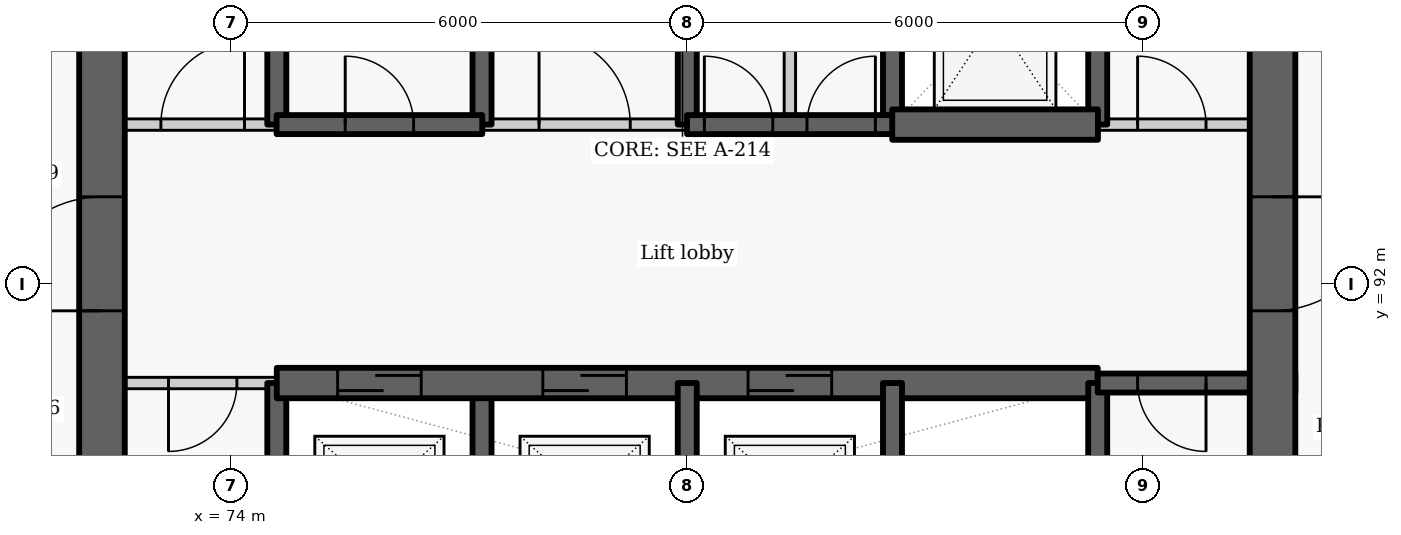
"""IFC4 building model, lengths in metres.
Left out: names, types, materials, properties, quantities, classifications, styles, units other than length and angle.
Written with IfcOpenShell. Run it as: python <this file> out.ifc"""

import sys

from ifc_helpers import new_model, si_unit, direction, frame, frame_2d, origin, place, context, subcontext, project, spatial, rectangle, extrude, element, fill, save


model = new_model("IFC4")
c1 = context("Model", 3, precision=1e-05, world=origin(), true_north=direction((0.0, 1.0)))
c2 = subcontext(c1, "Body", "Model", "MODEL_VIEW")
j1 = project(units=[si_unit("LENGTHUNIT", "METRE"), si_unit("PLANEANGLEUNIT", "RADIAN")], contexts=[c1])
p1 = place(None, origin())
s1 = spatial("IfcSite", under=j1, at=p1, CompositionType="ELEMENT")
p2 = place(p1, origin())
s2 = spatial("IfcBuilding", under=s1, at=p2, CompositionType="ELEMENT")
p3 = place(p2, frame((0.0, 0.0, 67.8)))
s3 = spatial("IfcBuildingStorey", under=s2, at=p3, CompositionType="ELEMENT", Elevation=67.8)
p4 = place(p3, frame((74.6, 87.8, -0.275), z_axis=(0.0, 0.0, 1.0), x_axis=(0.0, 1.0, 0.0)))
e1 = element("IfcWall", 1, at=p4, inside=s3, PredefinedType="SHEAR", context=c2, shape_type="SweptSolid", body=[
    extrude(rectangle(XDim=2.9, YDim=0.25, at=frame_2d((1.45, 0.0))), origin(), (0.0, 0.0, 1.0), 3.225),
])
p5 = place(p3, frame((74.6, 94.1, -0.275), z_axis=(0.0, 0.0, 1.0), x_axis=(0.0, 1.0, 0.0)))
e2 = element("IfcWall", 2, at=p5, inside=s3, PredefinedType="SHEAR", context=c2, shape_type="SweptSolid", body=[
    extrude(rectangle(XDim=2.8, YDim=0.25, at=frame_2d((1.4, 0.0))), origin(), (0.0, 0.0, 1.0), 3.225),
])
p6 = place(p3, frame((74.6, 90.7, 0.0), z_axis=(0.0, 0.0, 1.0), x_axis=(-1.0, 0.0, 0.0)))
e3 = element("IfcWall", 3, at=p6, inside=s3, PredefinedType="PARTITIONING", context=c2, shape_type="SweptSolid", body=[
    extrude(rectangle(XDim=2.6, YDim=0.15, at=frame_2d((1.3, 0.0))), origin(), (0.0, 0.0, 1.0), 2.95),
])
p7 = place(p6, frame((0.525, 0.0, 0.0)))
e4 = element("IfcOpeningElement", 4, at=p7, cuts=e3, PredefinedType="OPENING", context=c2, shape_type="SweptSolid", body=[
    extrude(rectangle(XDim=0.9, YDim=2.1, at=frame_2d((0.45, 1.05))), frame((0.0, 0.085, 0.0), z_axis=(0.0, -1.0, 0.0), x_axis=(1.0, 0.0, 0.0)), (0.0, 0.0, 1.0), 0.17),
])
p8 = place(p3, frame((72.3, 87.8, -0.275), z_axis=(0.0, 0.0, 1.0), x_axis=(0.0, 1.0, 0.0)))
e5 = element("IfcWall", 5, at=p8, inside=s3, PredefinedType="SHEAR", context=c2, shape_type="SweptSolid", body=[
    extrude(rectangle(XDim=9.1, YDim=0.6, at=frame_2d((4.55, 0.0))), origin(), (0.0, 0.0, 1.0), 3.225),
])
p9 = place(p8, frame((3.85, 0.0, 0.275)))
e6 = element("IfcOpeningElement", 6, at=p9, cuts=e5, PredefinedType="OPENING", context=c2, shape_type="SweptSolid", body=[
    extrude(rectangle(XDim=1.5, YDim=2.1, at=frame_2d((0.75, 1.05))), frame((0.0, 0.31, 0.0), z_axis=(0.0, -1.0, 0.0), x_axis=(1.0, 0.0, 0.0)), (0.0, 0.0, 1.0), 0.62),
])
p10 = place(p3, frame((77.3, 87.8, -0.275), z_axis=(0.0, 0.0, 1.0), x_axis=(0.0, 1.0, 0.0)))
e7 = element("IfcWall", 7, at=p10, inside=s3, PredefinedType="SHEAR", context=c2, shape_type="SweptSolid", body=[
    extrude(rectangle(XDim=2.9, YDim=0.25, at=frame_2d((1.45, 0.0))), origin(), (0.0, 0.0, 1.0), 3.225),
])
p11 = place(p3, frame((77.3, 94.1, -0.275), z_axis=(0.0, 0.0, 1.0), x_axis=(0.0, 1.0, 0.0)))
e8 = element("IfcWall", 8, at=p11, inside=s3, PredefinedType="SHEAR", context=c2, shape_type="SweptSolid", body=[
    extrude(rectangle(XDim=2.8, YDim=0.25, at=frame_2d((1.4, 0.0))), origin(), (0.0, 0.0, 1.0), 3.225),
])
p12 = place(p3, frame((74.6, 90.7, -0.275), z_axis=(0.0, 0.0, 1.0), x_axis=(1.0, 0.0, 0.0)))
e9 = element("IfcWall", 9, at=p12, inside=s3, PredefinedType="SHEAR", context=c2, shape_type="SweptSolid", body=[
    extrude(rectangle(XDim=10.8, YDim=0.4, at=frame_2d((5.4, 0.0))), origin(), (0.0, 0.0, 1.0), 3.225),
])
p13 = place(p12, frame((0.8, 0.0, 0.275)))
e10 = element("IfcOpeningElement", 10, at=p13, cuts=e9, PredefinedType="OPENING", context=c2, shape_type="SweptSolid", body=[
    extrude(rectangle(XDim=1.1, YDim=2.1, at=frame_2d((0.55, 1.05))), frame((0.0, 0.21, 0.0), z_axis=(0.0, -1.0, 0.0), x_axis=(1.0, 0.0, 0.0)), (0.0, 0.0, 1.0), 0.42),
])
p14 = place(p12, frame((3.5, 0.0, 0.275)))
e11 = element("IfcOpeningElement", 11, at=p14, cuts=e9, PredefinedType="OPENING", context=c2, shape_type="SweptSolid", body=[
    extrude(rectangle(XDim=1.1, YDim=2.1, at=frame_2d((0.55, 1.05))), frame((0.0, 0.21, 0.0), z_axis=(0.0, -1.0, 0.0), x_axis=(1.0, 0.0, 0.0)), (0.0, 0.0, 1.0), 0.42),
])
p15 = place(p12, frame((6.2, 0.0, 0.275)))
e12 = element("IfcOpeningElement", 12, at=p15, cuts=e9, PredefinedType="OPENING", context=c2, shape_type="SweptSolid", body=[
    extrude(rectangle(XDim=1.1, YDim=2.1, at=frame_2d((0.55, 1.05))), frame((0.0, 0.21, 0.0), z_axis=(0.0, -1.0, 0.0), x_axis=(1.0, 0.0, 0.0)), (0.0, 0.0, 1.0), 0.42),
])
p16 = place(p3, frame((80.0, 87.8, -0.275), z_axis=(0.0, 0.0, 1.0), x_axis=(0.0, 1.0, 0.0)))
e13 = element("IfcWall", 13, at=p16, inside=s3, PredefinedType="SHEAR", context=c2, shape_type="SweptSolid", body=[
    extrude(rectangle(XDim=2.9, YDim=0.25, at=frame_2d((1.45, 0.0))), origin(), (0.0, 0.0, 1.0), 3.225),
])
p17 = place(p3, frame((80.0, 94.1, -0.275), z_axis=(0.0, 0.0, 1.0), x_axis=(0.0, 1.0, 0.0)))
e14 = element("IfcWall", 14, at=p17, inside=s3, PredefinedType="SHEAR", context=c2, shape_type="SweptSolid", body=[
    extrude(rectangle(XDim=2.8, YDim=0.25, at=frame_2d((1.4, 0.0))), origin(), (0.0, 0.0, 1.0), 3.225),
])
p18 = place(p3, frame((82.7, 87.8, -0.275), z_axis=(0.0, 0.0, 1.0), x_axis=(0.0, 1.0, 0.0)))
e15 = element("IfcWall", 15, at=p18, inside=s3, PredefinedType="SHEAR", context=c2, shape_type="SweptSolid", body=[
    extrude(rectangle(XDim=2.9, YDim=0.25, at=frame_2d((1.45, 0.0))), origin(), (0.0, 0.0, 1.0), 3.225),
])
p19 = place(p3, frame((82.7, 94.1, -0.275), z_axis=(0.0, 0.0, 1.0), x_axis=(0.0, 1.0, 0.0)))
e16 = element("IfcWall", 16, at=p19, inside=s3, PredefinedType="SHEAR", context=c2, shape_type="SweptSolid", body=[
    extrude(rectangle(XDim=2.8, YDim=0.25, at=frame_2d((1.4, 0.0))), origin(), (0.0, 0.0, 1.0), 3.225),
])
p20 = place(p3, frame((85.4, 87.8, -0.275), z_axis=(0.0, 0.0, 1.0), x_axis=(0.0, 1.0, 0.0)))
e17 = element("IfcWall", 17, at=p20, inside=s3, PredefinedType="SHEAR", context=c2, shape_type="SweptSolid", body=[
    extrude(rectangle(XDim=2.9, YDim=0.25, at=frame_2d((1.45, 0.0))), origin(), (0.0, 0.0, 1.0), 3.225),
])
p21 = place(p3, frame((85.4, 94.1, -0.275), z_axis=(0.0, 0.0, 1.0), x_axis=(0.0, 1.0, 0.0)))
e18 = element("IfcWall", 18, at=p21, inside=s3, PredefinedType="SHEAR", context=c2, shape_type="SweptSolid", body=[
    extrude(rectangle(XDim=2.8, YDim=0.25, at=frame_2d((1.4, 0.0))), origin(), (0.0, 0.0, 1.0), 3.225),
])
p22 = place(p3, frame((88.0, 90.7, -0.275), z_axis=(0.0, 0.0, 1.0), x_axis=(-1.0, 0.0, 0.0)))
e19 = element("IfcWall", 19, at=p22, inside=s3, PredefinedType="SHEAR", context=c2, shape_type="SweptSolid", body=[
    extrude(rectangle(XDim=2.6, YDim=0.25, at=frame_2d((1.3, 0.0))), origin(), (0.0, 0.0, 1.0), 3.225),
])
p23 = place(p22, frame((1.175, 0.0, 0.275)))
e20 = element("IfcOpeningElement", 20, at=p23, cuts=e19, PredefinedType="OPENING", context=c2, shape_type="SweptSolid", body=[
    extrude(rectangle(XDim=0.9, YDim=2.1, at=frame_2d((0.45, 1.05))), frame((0.0, 0.135, 0.0), z_axis=(0.0, -1.0, 0.0), x_axis=(1.0, 0.0, 0.0)), (0.0, 0.0, 1.0), 0.27),
])
p24 = place(p3, frame((87.7, 103.4, -0.275), z_axis=(0.0, 0.0, 1.0), x_axis=(0.0, -1.0, 0.0)))
e21 = element("IfcWall", 21, at=p24, inside=s3, PredefinedType="SHEAR", context=c2, shape_type="SweptSolid", body=[
    extrude(rectangle(XDim=15.6, YDim=0.6, at=frame_2d((7.8, 0.0))), origin(), (0.0, 0.0, 1.0), 3.225),
])
p25 = place(p24, frame((10.25, 0.0, 0.275)))
e22 = element("IfcOpeningElement", 22, at=p25, cuts=e21, PredefinedType="OPENING", context=c2, shape_type="SweptSolid", body=[
    extrude(rectangle(XDim=1.5, YDim=2.1, at=frame_2d((0.75, 1.05))), frame((0.0, 0.31, 0.0), z_axis=(0.0, -1.0, 0.0), x_axis=(1.0, 0.0, 0.0)), (0.0, 0.0, 1.0), 0.62),
])
p26 = place(p24, frame((2.7, 0.0, 0.275)))
e23 = element("IfcOpeningElement", 23, at=p26, cuts=e21, PredefinedType="OPENING", context=c2, shape_type="SweptSolid", body=[
    extrude(rectangle(XDim=1.1, YDim=2.1, at=frame_2d((0.55, 1.05))), frame((0.0, 0.31, 0.0), z_axis=(0.0, -1.0, 0.0), x_axis=(1.0, 0.0, 0.0)), (0.0, 0.0, 1.0), 0.62),
])
p27 = place(p3, frame((72.0, 94.1, 0.0), z_axis=(0.0, 0.0, 1.0), x_axis=(1.0, 0.0, 0.0)))
e24 = element("IfcWall", 24, at=p27, inside=s3, PredefinedType="PARTITIONING", context=c2, shape_type="SweptSolid", body=[
    extrude(rectangle(XDim=2.603, YDim=0.15, at=frame_2d((1.302, 0.0))), origin(), (0.0, 0.0, 1.0), 2.95),
])
p28 = place(p27, frame((1.075, 0.0, 0.0)))
e25 = element("IfcOpeningElement", 25, at=p28, cuts=e24, PredefinedType="OPENING", context=c2, shape_type="SweptSolid", body=[
    extrude(rectangle(XDim=1.1, YDim=2.1, at=frame_2d((0.55, 1.05))), frame((0.0, 0.085, 0.0), z_axis=(0.0, -1.0, 0.0), x_axis=(1.0, 0.0, 0.0)), (0.0, 0.0, 1.0), 0.17),
])
p29 = place(p3, frame((77.297, 94.1, 0.0), z_axis=(0.0, 0.0, 1.0), x_axis=(1.0, 0.0, 0.0)))
e26 = element("IfcWall", 26, at=p29, inside=s3, PredefinedType="PARTITIONING", context=c2, shape_type="SweptSolid", body=[
    extrude(rectangle(XDim=2.706, YDim=0.15, at=frame_2d((1.353, 0.0))), origin(), (0.0, 0.0, 1.0), 2.95),
])
p30 = place(p29, frame((0.753, 0.0, 0.0)))
e27 = element("IfcOpeningElement", 27, at=p30, cuts=e26, PredefinedType="OPENING", context=c2, shape_type="SweptSolid", body=[
    extrude(rectangle(XDim=1.2, YDim=2.1, at=frame_2d((0.6, 1.05))), frame((0.0, 0.085, 0.0), z_axis=(0.0, -1.0, 0.0), x_axis=(1.0, 0.0, 0.0)), (0.0, 0.0, 1.0), 0.17),
])
p31 = place(p3, frame((85.397, 94.1, 0.0), z_axis=(0.0, 0.0, 1.0), x_axis=(1.0, 0.0, 0.0)))
e28 = element("IfcWall", 28, at=p31, inside=s3, PredefinedType="PARTITIONING", context=c2, shape_type="SweptSolid", body=[
    extrude(rectangle(XDim=2.603, YDim=0.15, at=frame_2d((1.302, 0.0))), origin(), (0.0, 0.0, 1.0), 2.95),
])
p32 = place(p31, frame((0.528, 0.0, 0.0)))
e29 = element("IfcOpeningElement", 29, at=p32, cuts=e28, PredefinedType="OPENING", context=c2, shape_type="SweptSolid", body=[
    extrude(rectangle(XDim=0.9, YDim=2.1, at=frame_2d((0.45, 1.05))), frame((0.0, 0.085, 0.0), z_axis=(0.0, -1.0, 0.0), x_axis=(1.0, 0.0, 0.0)), (0.0, 0.0, 1.0), 0.17),
])
p33 = place(p3, frame((74.597, 94.1, -0.275), z_axis=(0.0, 0.0, 1.0), x_axis=(1.0, 0.0, 0.0)))
e30 = element("IfcWall", 30, at=p33, inside=s3, PredefinedType="SHEAR", context=c2, shape_type="SweptSolid", body=[
    extrude(rectangle(XDim=2.706, YDim=0.25, at=frame_2d((1.353, 0.0))), origin(), (0.0, 0.0, 1.0), 3.225),
])
p34 = place(p33, frame((0.903, 0.0, 0.275)))
e31 = element("IfcOpeningElement", 31, at=p34, cuts=e30, PredefinedType="OPENING", context=c2, shape_type="SweptSolid", body=[
    extrude(rectangle(XDim=0.9, YDim=2.1, at=frame_2d((0.45, 1.05))), frame((0.0, 0.135, 0.0), z_axis=(0.0, -1.0, 0.0), x_axis=(1.0, 0.0, 0.0)), (0.0, 0.0, 1.0), 0.27),
])
p35 = place(p3, frame((79.997, 94.1, -0.275), z_axis=(0.0, 0.0, 1.0), x_axis=(1.0, 0.0, 0.0)))
e32 = element("IfcWall", 32, at=p35, inside=s3, PredefinedType="SHEAR", context=c2, shape_type="SweptSolid", body=[
    extrude(rectangle(XDim=2.706, YDim=0.25, at=frame_2d((1.353, 0.0))), origin(), (0.0, 0.0, 1.0), 3.225),
])
p36 = place(p35, frame((0.228, 0.0, 0.275)))
e33 = element("IfcOpeningElement", 33, at=p36, cuts=e32, PredefinedType="OPENING", context=c2, shape_type="SweptSolid", body=[
    extrude(rectangle(XDim=0.9, YDim=2.1, at=frame_2d((0.45, 1.05))), frame((0.0, 0.135, 0.0), z_axis=(0.0, -1.0, 0.0), x_axis=(1.0, 0.0, 0.0)), (0.0, 0.0, 1.0), 0.27),
])
p37 = place(p35, frame((1.578, 0.0, 0.275)))
e34 = element("IfcOpeningElement", 34, at=p37, cuts=e32, PredefinedType="OPENING", context=c2, shape_type="SweptSolid", body=[
    extrude(rectangle(XDim=0.9, YDim=2.1, at=frame_2d((0.45, 1.05))), frame((0.0, 0.135, 0.0), z_axis=(0.0, -1.0, 0.0), x_axis=(1.0, 0.0, 0.0)), (0.0, 0.0, 1.0), 0.27),
])
p38 = place(p3, frame((82.697, 94.1, -0.275), z_axis=(0.0, 0.0, 1.0), x_axis=(1.0, 0.0, 0.0)))
e35 = element("IfcWall", 35, at=p38, inside=s3, PredefinedType="SHEAR", context=c2, shape_type="SweptSolid", body=[
    extrude(rectangle(XDim=2.706, YDim=0.4, at=frame_2d((1.353, 0.0))), origin(), (0.0, 0.0, 1.0), 3.225),
])
p39 = place(p3, frame((81.35, 94.1, 0.0), z_axis=(0.0, 0.0, 1.0), x_axis=(0.0, 1.0, 0.0)))
e36 = element("IfcWall", 36, at=p39, inside=s3, PredefinedType="PARTITIONING", context=c2, shape_type="SweptSolid", body=[
    extrude(rectangle(XDim=2.8, YDim=0.15, at=frame_2d((1.4, 0.0))), origin(), (0.0, 0.0, 1.0), 2.95),
])
p40 = place(p7, origin())
e37 = element("IfcDoor", 37, at=p40, inside=s3, OperationType="SINGLE_SWING_RIGHT", PredefinedType="DOOR", context=c2, shape_type="SweptSolid", body=[
    extrude(rectangle(XDim=0.9, YDim=2.1, at=frame_2d((0.45, 1.05))), frame((0.0, 0.025, 0.0), z_axis=(0.0, -1.0, 0.0), x_axis=(1.0, 0.0, 0.0)), (0.0, 0.0, 1.0), 0.05),
])
fill(e4, e37)
p41 = place(p13, origin())
e38 = element("IfcDoor", 38, at=p41, inside=s3, OperationType="SLIDING_TO_LEFT", PredefinedType="DOOR", context=c2, shape_type="SweptSolid", body=[
    extrude(rectangle(XDim=1.1, YDim=2.1, at=frame_2d((0.55, 1.05))), frame((0.0, 0.025, 0.0), z_axis=(0.0, -1.0, 0.0), x_axis=(1.0, 0.0, 0.0)), (0.0, 0.0, 1.0), 0.05),
])
fill(e10, e38)
p42 = place(p14, origin())
e39 = element("IfcDoor", 39, at=p42, inside=s3, OperationType="SLIDING_TO_LEFT", PredefinedType="DOOR", context=c2, shape_type="SweptSolid", body=[
    extrude(rectangle(XDim=1.1, YDim=2.1, at=frame_2d((0.55, 1.05))), frame((0.0, 0.025, 0.0), z_axis=(0.0, -1.0, 0.0), x_axis=(1.0, 0.0, 0.0)), (0.0, 0.0, 1.0), 0.05),
])
fill(e11, e39)
p43 = place(p15, origin())
e40 = element("IfcDoor", 40, at=p43, inside=s3, OperationType="SLIDING_TO_LEFT", PredefinedType="DOOR", context=c2, shape_type="SweptSolid", body=[
    extrude(rectangle(XDim=1.1, YDim=2.1, at=frame_2d((0.55, 1.05))), frame((0.0, 0.025, 0.0), z_axis=(0.0, -1.0, 0.0), x_axis=(1.0, 0.0, 0.0)), (0.0, 0.0, 1.0), 0.05),
])
fill(e12, e40)
p44 = place(p23, origin())
e41 = element("IfcDoor", 41, at=p44, inside=s3, OperationType="SINGLE_SWING_LEFT", PredefinedType="DOOR", context=c2, shape_type="SweptSolid", body=[
    extrude(rectangle(XDim=0.9, YDim=2.1, at=frame_2d((0.45, 1.05))), frame((0.0, 0.025, 0.0), z_axis=(0.0, -1.0, 0.0), x_axis=(1.0, 0.0, 0.0)), (0.0, 0.0, 1.0), 0.05),
])
fill(e20, e41)
p45 = place(p28, origin())
e42 = element("IfcDoor", 42, at=p45, inside=s3, OperationType="SINGLE_SWING_RIGHT", PredefinedType="DOOR", context=c2, shape_type="SweptSolid", body=[
    extrude(rectangle(XDim=1.1, YDim=2.1, at=frame_2d((0.55, 1.05))), frame((0.0, 0.025, 0.0), z_axis=(0.0, -1.0, 0.0), x_axis=(1.0, 0.0, 0.0)), (0.0, 0.0, 1.0), 0.05),
])
fill(e25, e42)
p46 = place(p34, origin())
e43 = element("IfcDoor", 43, at=p46, inside=s3, OperationType="SINGLE_SWING_LEFT", PredefinedType="DOOR", context=c2, shape_type="SweptSolid", body=[
    extrude(rectangle(XDim=0.9, YDim=2.1, at=frame_2d((0.45, 1.05))), frame((0.0, 0.025, 0.0), z_axis=(0.0, -1.0, 0.0), x_axis=(1.0, 0.0, 0.0)), (0.0, 0.0, 1.0), 0.05),
])
fill(e31, e43)
p47 = place(p30, origin())
e44 = element("IfcDoor", 44, at=p47, inside=s3, OperationType="DOUBLE_DOOR_SINGLE_SWING", PredefinedType="DOOR", context=c2, shape_type="SweptSolid", body=[
    extrude(rectangle(XDim=1.2, YDim=2.1, at=frame_2d((0.6, 1.05))), frame((0.0, 0.025, 0.0), z_axis=(0.0, -1.0, 0.0), x_axis=(1.0, 0.0, 0.0)), (0.0, 0.0, 1.0), 0.05),
])
fill(e27, e44)
p48 = place(p36, origin())
e45 = element("IfcDoor", 45, at=p48, inside=s3, OperationType="SINGLE_SWING_LEFT", PredefinedType="DOOR", context=c2, shape_type="SweptSolid", body=[
    extrude(rectangle(XDim=0.9, YDim=2.1, at=frame_2d((0.45, 1.05))), frame((0.0, 0.025, 0.0), z_axis=(0.0, -1.0, 0.0), x_axis=(1.0, 0.0, 0.0)), (0.0, 0.0, 1.0), 0.05),
])
fill(e33, e45)
p49 = place(p37, origin())
e46 = element("IfcDoor", 46, at=p49, inside=s3, OperationType="SINGLE_SWING_RIGHT", PredefinedType="DOOR", context=c2, shape_type="SweptSolid", body=[
    extrude(rectangle(XDim=0.9, YDim=2.1, at=frame_2d((0.45, 1.05))), frame((0.0, 0.025, 0.0), z_axis=(0.0, -1.0, 0.0), x_axis=(1.0, 0.0, 0.0)), (0.0, 0.0, 1.0), 0.05),
])
fill(e34, e46)
p50 = place(p32, origin())
e47 = element("IfcDoor", 47, at=p50, inside=s3, OperationType="SINGLE_SWING_LEFT", PredefinedType="DOOR", context=c2, shape_type="SweptSolid", body=[
    extrude(rectangle(XDim=0.9, YDim=2.1, at=frame_2d((0.45, 1.05))), frame((0.0, 0.025, 0.0), z_axis=(0.0, -1.0, 0.0), x_axis=(1.0, 0.0, 0.0)), (0.0, 0.0, 1.0), 0.05),
])
fill(e29, e47)
p51 = place(p25, origin())
e48 = element("IfcDoor", 48, at=p51, inside=s3, OperationType="DOUBLE_DOOR_SINGLE_SWING", PredefinedType="DOOR", context=c2, shape_type="SweptSolid", body=[
    extrude(rectangle(XDim=1.5, YDim=2.1, at=frame_2d((0.75, 1.05))), frame((0.0, 0.025, 0.0), z_axis=(0.0, -1.0, 0.0), x_axis=(1.0, 0.0, 0.0)), (0.0, 0.0, 1.0), 0.05),
])
fill(e22, e48)
p52 = place(p9, origin())
e49 = element("IfcDoor", 49, at=p52, inside=s3, OperationType="DOUBLE_DOOR_SINGLE_SWING", PredefinedType="DOOR", context=c2, shape_type="SweptSolid", body=[
    extrude(rectangle(XDim=1.5, YDim=2.1, at=frame_2d((0.75, 1.05))), frame((0.0, 0.025, 0.0), z_axis=(0.0, -1.0, 0.0), x_axis=(1.0, 0.0, 0.0)), (0.0, 0.0, 1.0), 0.05),
])
fill(e6, e49)
save(model, sys.argv[1])
